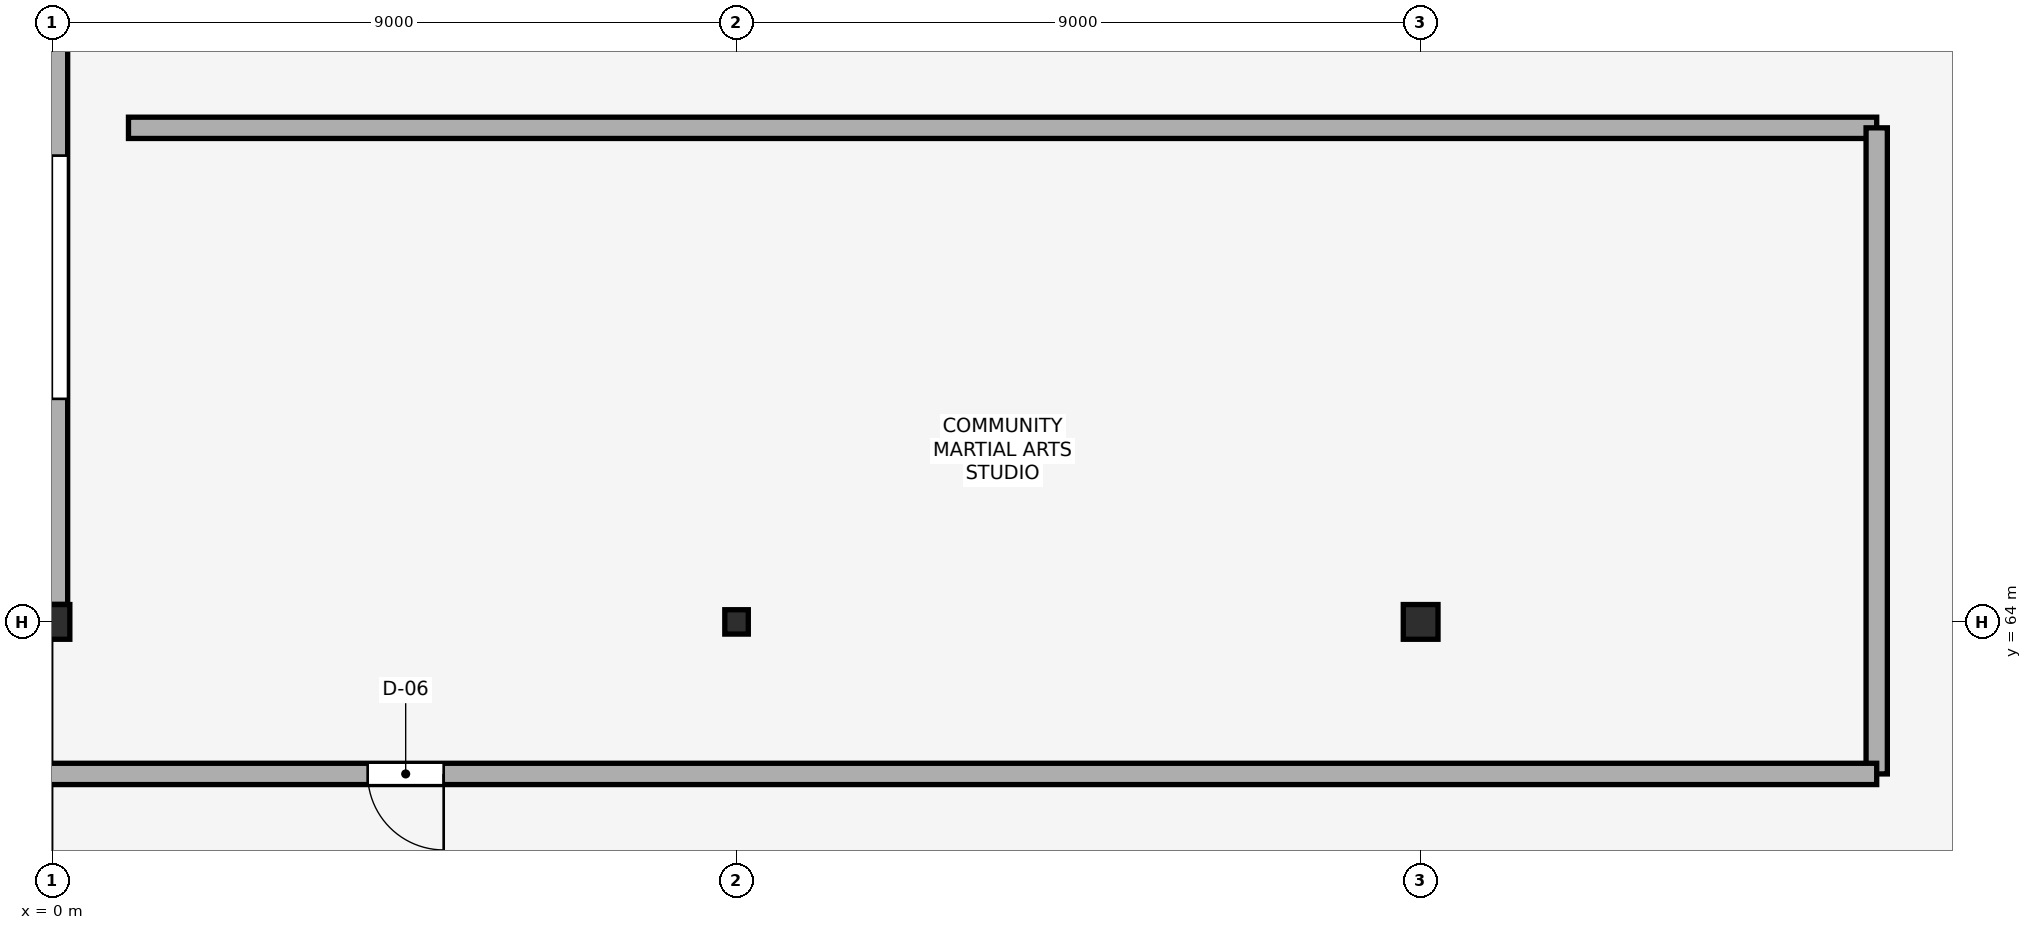
"""IFC4 building model, lengths in metres.
Left out: names, types, materials, properties, quantities, classifications, styles, units other than length and angle.
Written with IfcOpenShell. Run it as: python <this file> out.ifc"""

import sys

from ifc_helpers import new_model, si_unit, direction, frame, frame_2d, origin, origin_2d, place, context, subcontext, project, spatial, rectangle, hollow_circle, i_section, extrude, element, fill, save


model = new_model("IFC4")
c1 = context("Model", 3, precision=1e-05, world=origin(), true_north=direction((0.0, 1.0)))
c2 = subcontext(c1, "Body", "Model", "MODEL_VIEW")
j1 = project(units=[si_unit("LENGTHUNIT", "METRE"), si_unit("PLANEANGLEUNIT", "RADIAN")], contexts=[c1])
p1 = place(None, origin())
s1 = spatial("IfcSite", under=j1, at=p1, CompositionType="ELEMENT")
p2 = place(p1, origin())
s2 = spatial("IfcBuilding", under=s1, at=p2, CompositionType="ELEMENT")
p3 = place(p2, frame((0.0, 0.0, 5.4)))
s3 = spatial("IfcBuildingStorey", under=s2, at=p3, CompositionType="ELEMENT", Elevation=5.4)
p4 = place(p3, frame((0.0, 64.0, 0.0), z_axis=(0.0, 0.0, 1.0), x_axis=(1.0, 0.0, 0.0)))
e1 = element("IfcColumn", 1, at=p4, inside=s3, PredefinedType="COLUMN", context=c2, shape_type="SweptSolid", body=[
    extrude(hollow_circle(Radius=0.229, WallThickness=0.02, at=origin_2d()), origin(), (0.0, 0.0, 1.0), 4.8),
])
p5 = place(p3, frame((9.0, 64.0, 0.0), z_axis=(0.0, 0.0, 1.0), x_axis=(1.0, 0.0, 0.0)))
e2 = element("IfcColumn", 2, at=p5, inside=s3, PredefinedType="COLUMN", context=c2, shape_type="SweptSolid", body=[
    extrude(i_section(OverallWidth=0.309, OverallDepth=0.321, WebThickness=0.014, FlangeThickness=0.022, FilletRadius=0.015, at=origin_2d()), origin(), (0.0, 0.0, 1.0), 4.8),
])
p6 = place(p3, frame((18.0, 64.0, 0.0), z_axis=(0.0, 0.0, 1.0), x_axis=(1.0, 0.0, 0.0)))
e3 = element("IfcColumn", 3, at=p6, inside=s3, PredefinedType="COLUMN", context=c2, shape_type="SweptSolid", body=[
    extrude(hollow_circle(Radius=0.229, WallThickness=0.02, at=origin_2d()), origin(), (0.0, 0.0, 1.0), 4.8),
])
p7 = place(p3, frame((0.0, 64.23, 0.0), z_axis=(0.0, 0.0, 1.0), x_axis=(0.0, 1.0, 0.0)))
e4 = element("IfcWall", 4, at=p7, inside=s3, PredefinedType="STANDARD", context=c2, shape_type="SweptSolid", body=[
    extrude(rectangle(XDim=8.607, YDim=0.4, at=frame_2d((4.304, 0.0))), origin(), (0.0, 0.0, 1.0), 4.215),
])
p8 = place(p7, frame((2.704, 0.0, 0.95)))
e5 = element("IfcOpeningElement", 5, at=p8, cuts=e4, PredefinedType="OPENING", context=c2, shape_type="SweptSolid", body=[
    extrude(rectangle(XDim=3.2, YDim=1.8, at=frame_2d((1.6, 0.9))), frame((0.0, 0.21, 0.0), z_axis=(0.0, -1.0, 0.0), x_axis=(1.0, 0.0, 0.0)), (0.0, 0.0, 1.0), 0.42),
])
p9 = place(p3, frame((1.0, 70.5, 0.0), z_axis=(0.0, 0.0, 1.0), x_axis=(1.0, 0.0, 0.0)))
e6 = element("IfcWall", 6, at=p9, inside=s3, PredefinedType="PARTITIONING", context=c2, shape_type="SweptSolid", body=[
    extrude(rectangle(XDim=23.0, YDim=0.28, at=frame_2d((11.5, 0.0))), origin(), (0.0, 0.0, 1.0), 4.52),
])
p10 = place(p3, frame((24.0, 70.5, 0.0), z_axis=(0.0, 0.0, 1.0), x_axis=(0.0, -1.0, 0.0)))
e7 = element("IfcWall", 7, at=p10, inside=s3, PredefinedType="PARTITIONING", context=c2, shape_type="SweptSolid", body=[
    extrude(rectangle(XDim=8.5, YDim=0.28, at=frame_2d((4.25, 0.0))), origin(), (0.0, 0.0, 1.0), 4.52),
])
p11 = place(p3, frame((24.0, 62.0, 0.0), z_axis=(0.0, 0.0, 1.0), x_axis=(-1.0, 0.0, 0.0)))
e8 = element("IfcWall", 8, at=p11, inside=s3, PredefinedType="PARTITIONING", context=c2, shape_type="SweptSolid", body=[
    extrude(rectangle(XDim=24.125, YDim=0.28, at=frame_2d((12.062, 0.0))), origin(), (0.0, 0.0, 1.0), 4.52),
])
p12 = place(p11, frame((18.853, 0.0, 0.0)))
e9 = element("IfcOpeningElement", 9, at=p12, cuts=e8, PredefinedType="OPENING", context=c2, shape_type="SweptSolid", body=[
    extrude(rectangle(XDim=1.0, YDim=2.15, at=frame_2d((0.5, 1.075))), frame((0.0, 0.15, 0.0), z_axis=(0.0, -1.0, 0.0), x_axis=(1.0, 0.0, 0.0)), (0.0, 0.0, 1.0), 0.3),
])
p13 = place(p8, origin())
e10 = element("IfcWindow", 10, at=p13, inside=s3, PartitioningType="SINGLE_PANEL", PredefinedType="WINDOW", context=c2, shape_type="SweptSolid", body=[
    extrude(rectangle(XDim=3.2, YDim=1.8, at=frame_2d((1.6, 0.9))), frame((0.0, 0.03, 0.0), z_axis=(0.0, -1.0, 0.0), x_axis=(1.0, 0.0, 0.0)), (0.0, 0.0, 1.0), 0.06),
])
fill(e5, e10)
p14 = place(p12, origin())
e11 = element("IfcDoor", 11, at=p14, inside=s3, OperationType="SINGLE_SWING_LEFT", PredefinedType="DOOR", context=c2, shape_type="SweptSolid", body=[
    extrude(rectangle(XDim=1.0, YDim=2.15, at=frame_2d((0.5, 1.075))), frame((0.0, 0.025, 0.0), z_axis=(0.0, -1.0, 0.0), x_axis=(1.0, 0.0, 0.0)), (0.0, 0.0, 1.0), 0.05),
])
fill(e9, e11)
save(model, sys.argv[1])
